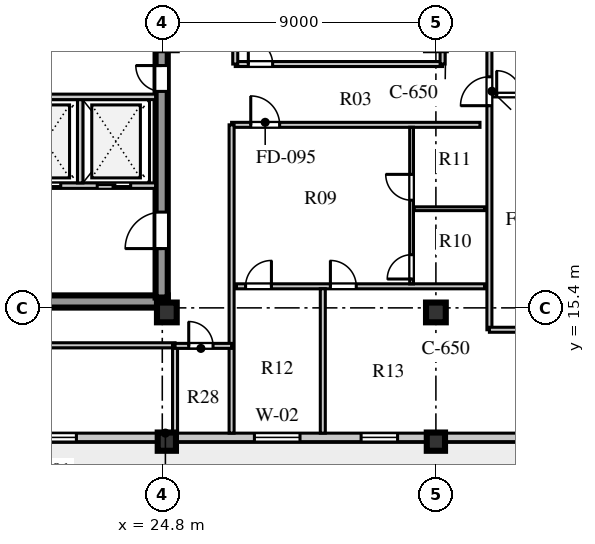
"""IFC4 building model, lengths in metres.
Left out: names, types, materials, properties, quantities, classifications, styles, units other than length and angle.
Written with IfcOpenShell. Run it as: python <this file> out.ifc"""

import sys

from ifc_helpers import new_model, si_unit, direction, frame, frame_2d, origin, origin_2d, place, context, subcontext, project, spatial, rectangle, extrude, element, fill, save


model = new_model("IFC4")
c1 = context("Model", 3, precision=1e-05, world=origin(), true_north=direction((0.0, 1.0)))
c2 = subcontext(c1, "Body", "Model", "MODEL_VIEW")
j1 = project(units=[si_unit("LENGTHUNIT", "METRE"), si_unit("PLANEANGLEUNIT", "RADIAN")], contexts=[c1])
p1 = place(None, origin())
s1 = spatial("IfcSite", under=j1, at=p1, CompositionType="ELEMENT")
p2 = place(p1, origin())
s2 = spatial("IfcBuilding", under=s1, at=p2, CompositionType="ELEMENT")
p3 = place(p2, frame((0.0, 0.0, 327.7)))
s3 = spatial("IfcBuildingStorey", under=s2, at=p3, CompositionType="ELEMENT", Elevation=327.7)
p4 = place(p3, frame((15.5, 15.61, 0.0), z_axis=(0.0, 0.0, 1.0), x_axis=(1.0, 0.0, 0.0)))
e1 = element("IfcWall", 1, at=p4, inside=s3, PredefinedType="SHEAR", context=c2, shape_type="SweptSolid", body=[
    extrude(rectangle(XDim=9.48, YDim=0.4, at=frame_2d((4.74, 0.0))), origin(), (0.0, 0.0, 1.0), 3.56),
])
p5 = place(p3, frame((24.78, 15.74, 0.0), z_axis=(0.0, 0.0, 1.0), x_axis=(0.0, 1.0, 0.0)))
e2 = element("IfcWall", 2, at=p5, inside=s3, PredefinedType="SHEAR", context=c2, shape_type="SweptSolid", body=[
    extrude(rectangle(XDim=25.76, YDim=0.4, at=frame_2d((12.88, 0.0))), origin(), (0.0, 0.0, 1.0), 3.56),
])
p6 = place(p5, frame((1.61, 0.0, 0.0)))
e3 = element("IfcOpeningElement", 3, at=p6, cuts=e2, PredefinedType="OPENING", context=c2, shape_type="SweptSolid", body=[
    extrude(rectangle(XDim=1.2, YDim=2.1, at=frame_2d((0.6, 1.05))), frame((0.0, 0.21, 0.0), z_axis=(0.0, -1.0, 0.0), x_axis=(1.0, 0.0, 0.0)), (0.0, 0.0, 1.0), 0.42),
])
p7 = place(p5, frame((6.78, 0.0, 0.0)))
e4 = element("IfcOpeningElement", 4, at=p7, cuts=e2, PredefinedType="OPENING", context=c2, shape_type="SweptSolid", body=[
    extrude(rectangle(XDim=0.85, YDim=2.06, at=frame_2d((0.425, 1.03))), frame((0.0, 0.21, 0.0), z_axis=(0.0, -1.0, 0.0), x_axis=(1.0, 0.0, 0.0)), (0.0, 0.0, 1.0), 0.42),
])
p8 = place(p5, frame((12.11, 0.0, 0.0)))
e5 = element("IfcOpeningElement", 5, at=p8, cuts=e2, PredefinedType="OPENING", context=c2, shape_type="SweptSolid", body=[
    extrude(rectangle(XDim=1.5, YDim=2.12, at=frame_2d((0.75, 1.06))), frame((0.0, 0.21, 0.0), z_axis=(0.0, -1.0, 0.0), x_axis=(1.0, 0.0, 0.0)), (0.0, 0.0, 1.0), 0.42),
])
p9 = place(p5, frame((20.11, 0.0, 0.0)))
e6 = element("IfcOpeningElement", 6, at=p9, cuts=e2, PredefinedType="OPENING", context=c2, shape_type="SweptSolid", body=[
    extrude(rectangle(XDim=1.2, YDim=2.12, at=frame_2d((0.6, 1.06))), frame((0.0, 0.21, 0.0), z_axis=(0.0, -1.0, 0.0), x_axis=(1.0, 0.0, 0.0)), (0.0, 0.0, 1.0), 0.42),
])
p10 = place(p5, frame((24.01, 0.0, 0.0)))
e7 = element("IfcOpeningElement", 7, at=p10, cuts=e2, PredefinedType="OPENING", context=c2, shape_type="SweptSolid", body=[
    extrude(rectangle(XDim=0.95, YDim=2.1, at=frame_2d((0.475, 1.05))), frame((0.0, 0.21, 0.0), z_axis=(0.0, -1.0, 0.0), x_axis=(1.0, 0.0, 0.0)), (0.0, 0.0, 1.0), 0.42),
])
for number, where, z_axis, x_axis in (
    (8, (24.95, 15.25, 0.0), (0.0, 0.0, 1.0), (1.0, 0.0, 0.0)),
    (9, (33.8, 15.25, 0.0), (0.0, 0.0, 1.0), (1.0, 0.0, 0.0)),
):
    element("IfcColumn", number, at=place(p3, frame(where, z_axis=z_axis, x_axis=x_axis)), inside=s3, PredefinedType="COLUMN", context=c2, shape_type="SweptSolid", body=[
        extrude(rectangle(XDim=0.65, YDim=0.65, at=origin_2d()), origin(), (0.0, 0.0, 1.0), 3.56),
    ])
for number, where, z_axis, x_axis in (
    (10, (24.95, 11.0, 0.0), (0.0, 0.0, 1.0), (1.0, 0.0, 0.0)),
    (11, (33.8, 11.0, 0.0), (0.0, 0.0, 1.0), (1.0, 0.0, 0.0)),
):
    element("IfcColumn", number, at=place(p3, frame(where, z_axis=z_axis, x_axis=x_axis)), inside=s3, PredefinedType="COLUMN", context=c2, shape_type="SweptSolid", body=[
        extrude(rectangle(XDim=0.6, YDim=0.6, at=origin_2d()), origin(), (0.0, 0.0, 1.0), 3.56),
    ])
p11 = place(p3, frame((13.6, 11.14, 0.0), z_axis=(0.0, 0.0, 1.0), x_axis=(1.0, 0.0, 0.0)))
e12 = element("IfcWall", 12, at=p11, inside=s3, PredefinedType="STANDARD", context=c2, shape_type="SweptSolid", body=[
    extrude(rectangle(XDim=28.0, YDim=0.28, at=frame_2d((14.0, 0.0))), origin(), (0.0, 0.0, 1.0), 2.92),
])
p12 = place(p11, frame((2.58, 0.0, 0.0)))
e13 = element("IfcOpeningElement", 13, at=p12, cuts=e12, PredefinedType="OPENING", context=c2, shape_type="SweptSolid", body=[
    extrude(rectangle(XDim=1.2, YDim=2.05, at=frame_2d((0.6, 1.025))), frame((0.0, 0.15, 0.0), z_axis=(0.0, -1.0, 0.0), x_axis=(1.0, 0.0, 0.0)), (0.0, 0.0, 1.0), 0.3),
])
p13 = place(p11, frame((6.575, 0.0, 0.8)))
e14 = element("IfcOpeningElement", 14, at=p13, cuts=e12, PredefinedType="OPENING", context=c2, shape_type="SweptSolid", body=[
    extrude(rectangle(XDim=1.8, YDim=2.0, at=frame_2d((0.9, 1.0))), frame((0.0, 0.15, 0.0), z_axis=(0.0, -1.0, 0.0), x_axis=(1.0, 0.0, 0.0)), (0.0, 0.0, 1.0), 0.3),
])
p14 = place(p11, frame((14.23, 0.0, 0.8)))
e15 = element("IfcOpeningElement", 15, at=p14, cuts=e12, PredefinedType="OPENING", context=c2, shape_type="SweptSolid", body=[
    extrude(rectangle(XDim=1.5, YDim=2.0, at=frame_2d((0.75, 1.0))), frame((0.0, 0.15, 0.0), z_axis=(0.0, -1.0, 0.0), x_axis=(1.0, 0.0, 0.0)), (0.0, 0.0, 1.0), 0.3),
])
p15 = place(p11, frame((17.74, 0.0, 0.8)))
e16 = element("IfcOpeningElement", 16, at=p15, cuts=e12, PredefinedType="OPENING", context=c2, shape_type="SweptSolid", body=[
    extrude(rectangle(XDim=1.2, YDim=1.75, at=frame_2d((0.6, 0.875))), frame((0.0, 0.15, 0.0), z_axis=(0.0, -1.0, 0.0), x_axis=(1.0, 0.0, 0.0)), (0.0, 0.0, 1.0), 0.3),
])
p16 = place(p11, frame((22.965, 0.0, 0.8)))
e17 = element("IfcOpeningElement", 17, at=p16, cuts=e12, PredefinedType="OPENING", context=c2, shape_type="SweptSolid", body=[
    extrude(rectangle(XDim=2.4, YDim=2.05, at=frame_2d((1.2, 1.025))), frame((0.0, 0.15, 0.0), z_axis=(0.0, -1.0, 0.0), x_axis=(1.0, 0.0, 0.0)), (0.0, 0.0, 1.0), 0.3),
])
p17 = place(p3, frame((19.64, 19.42, 0.0), z_axis=(0.0, 0.0, 1.0), x_axis=(1.0, 0.0, 0.0)))
e18 = element("IfcWall", 18, at=p17, inside=s3, PredefinedType="SOLIDWALL", context=c2, shape_type="SweptSolid", body=[
    extrude(rectangle(XDim=4.94, YDim=0.18, at=frame_2d((2.47, 0.0))), origin(), (0.0, 0.0, 1.0), 3.56),
])
p18 = place(p17, frame((0.72, 0.0, 0.0)))
e19 = element("IfcOpeningElement", 19, at=p18, cuts=e18, PredefinedType="OPENING", context=c2, shape_type="SweptSolid", body=[
    extrude(rectangle(XDim=1.1, YDim=2.1, at=frame_2d((0.55, 1.05))), frame((0.0, 0.1, 0.0), z_axis=(0.0, -1.0, 0.0), x_axis=(1.0, 0.0, 0.0)), (0.0, 0.0, 1.0), 0.2),
])
p19 = place(p17, frame((3.02, 0.0, 0.0)))
e20 = element("IfcOpeningElement", 20, at=p19, cuts=e18, PredefinedType="OPENING", context=c2, shape_type="SweptSolid", body=[
    extrude(rectangle(XDim=1.1, YDim=2.1, at=frame_2d((0.55, 1.05))), frame((0.0, 0.1, 0.0), z_axis=(0.0, -1.0, 0.0), x_axis=(1.0, 0.0, 0.0)), (0.0, 0.0, 1.0), 0.2),
])
p20 = place(p3, frame((22.1, 19.51, 0.0), z_axis=(0.0, 0.0, 1.0), x_axis=(0.0, 1.0, 0.0)))
e21 = element("IfcWall", 21, at=p20, inside=s3, PredefinedType="SOLIDWALL", context=c2, shape_type="SweptSolid", body=[
    extrude(rectangle(XDim=2.74, YDim=0.18, at=frame_2d((1.37, 0.0))), origin(), (0.0, 0.0, 1.0), 3.56),
])
p21 = place(p3, frame((19.64, 22.34, 0.0), z_axis=(0.0, 0.0, 1.0), x_axis=(1.0, 0.0, 0.0)))
e22 = element("IfcWall", 22, at=p21, inside=s3, PredefinedType="SOLIDWALL", context=c2, shape_type="SweptSolid", body=[
    extrude(rectangle(XDim=4.94, YDim=0.18, at=frame_2d((2.47, 0.0))), origin(), (0.0, 0.0, 1.0), 3.56),
])
p22 = place(p3, frame((27.08, 21.42, 0.0), z_axis=(0.0, 0.0, 1.0), x_axis=(1.0, 0.0, 0.0)))
e23 = element("IfcWall", 23, at=p22, inside=s3, PredefinedType="PARTITIONING", context=c2, shape_type="SweptSolid", body=[
    extrude(rectangle(XDim=8.17, YDim=0.165, at=frame_2d((4.085, 0.0))), origin(), (0.0, 0.0, 1.0), 3.26),
])
p23 = place(p22, frame((0.63, 0.0, 0.0)))
e24 = element("IfcOpeningElement", 24, at=p23, cuts=e23, PredefinedType="OPENING", context=c2, shape_type="SweptSolid", body=[
    extrude(rectangle(XDim=0.95, YDim=2.1, at=frame_2d((0.475, 1.05))), frame((0.0, 0.093, 0.0), z_axis=(0.0, -1.0, 0.0), x_axis=(1.0, 0.0, 0.0)), (0.0, 0.0, 1.0), 0.185),
])
p24 = place(p3, frame((27.08, 11.28, 0.0), z_axis=(0.0, 0.0, 1.0), x_axis=(0.0, 1.0, 0.0)))
e25 = element("IfcWall", 25, at=p24, inside=s3, PredefinedType="PARTITIONING", context=c2, shape_type="SweptSolid", body=[
    extrude(rectangle(XDim=10.14, YDim=0.165, at=frame_2d((5.07, 0.0))), origin(), (0.0, 0.0, 1.0), 3.56),
])
p25 = place(p3, frame((13.95, 14.17, 0.0), z_axis=(0.0, 0.0, 1.0), x_axis=(1.0, 0.0, 0.0)))
e26 = element("IfcWall", 26, at=p25, inside=s3, PredefinedType="PARTITIONING", context=c2, shape_type="SweptSolid", body=[
    extrude(rectangle(XDim=11.27, YDim=0.165, at=frame_2d((5.635, 0.0))), origin(), (0.0, 0.0, 1.0), 3.56),
])
p26 = place(p25, frame((3.2, 0.0, 0.0)))
e27 = element("IfcOpeningElement", 27, at=p26, cuts=e26, PredefinedType="OPENING", context=c2, shape_type="SweptSolid", body=[
    extrude(rectangle(XDim=0.95, YDim=2.08, at=frame_2d((0.475, 1.04))), frame((0.0, 0.093, 0.0), z_axis=(0.0, -1.0, 0.0), x_axis=(1.0, 0.0, 0.0)), (0.0, 0.0, 1.0), 0.185),
])
p27 = place(p3, frame((25.22, 11.28, 0.0), z_axis=(0.0, 0.0, 1.0), x_axis=(0.0, 1.0, 0.0)))
e28 = element("IfcWall", 28, at=p27, inside=s3, PredefinedType="PARTITIONING", context=c2, shape_type="SweptSolid", body=[
    extrude(rectangle(XDim=2.89, YDim=0.165, at=frame_2d((1.445, 0.0))), origin(), (0.0, 0.0, 1.0), 3.11),
])
p28 = place(p3, frame((27.24, 16.109, 0.0), z_axis=(0.0, 0.0, 1.0), x_axis=(1.0, 0.0, 0.0)))
e29 = element("IfcWall", 29, at=p28, inside=s3, PredefinedType="PARTITIONING", context=c2, shape_type="SweptSolid", body=[
    extrude(rectangle(XDim=8.16, YDim=0.165, at=frame_2d((4.08, 0.0))), origin(), (0.0, 0.0, 1.0), 3.56),
])
p29 = place(p28, frame((0.3, 0.0, 0.0)))
e30 = element("IfcOpeningElement", 30, at=p29, cuts=e29, PredefinedType="OPENING", context=c2, shape_type="SweptSolid", body=[
    extrude(rectangle(XDim=0.85, YDim=2.08, at=frame_2d((0.425, 1.04))), frame((0.0, 0.093, 0.0), z_axis=(0.0, -1.0, 0.0), x_axis=(1.0, 0.0, 0.0)), (0.0, 0.0, 1.0), 0.185),
])
p30 = place(p28, frame((3.09, 0.0, 0.0)))
e31 = element("IfcOpeningElement", 31, at=p30, cuts=e29, PredefinedType="OPENING", context=c2, shape_type="SweptSolid", body=[
    extrude(rectangle(XDim=0.85, YDim=2.08, at=frame_2d((0.425, 1.04))), frame((0.0, 0.093, 0.0), z_axis=(0.0, -1.0, 0.0), x_axis=(1.0, 0.0, 0.0)), (0.0, 0.0, 1.0), 0.185),
])
p31 = place(p3, frame((33.0, 16.189, 0.0), z_axis=(0.0, 0.0, 1.0), x_axis=(0.0, 1.0, 0.0)))
e32 = element("IfcWall", 32, at=p31, inside=s3, PredefinedType="PLUMBINGWALL", context=c2, shape_type="SweptSolid", body=[
    extrude(rectangle(XDim=5.151, YDim=0.125, at=frame_2d((2.576, 0.0))), origin(), (0.0, 0.0, 1.0), 3.56),
])
p32 = place(p31, frame((0.16, 0.0, 0.0)))
e33 = element("IfcOpeningElement", 33, at=p32, cuts=e32, PredefinedType="OPENING", context=c2, shape_type="SweptSolid", body=[
    extrude(rectangle(XDim=0.8, YDim=2.05, at=frame_2d((0.4, 1.025))), frame((0.0, 0.073, 0.0), z_axis=(0.0, -1.0, 0.0), x_axis=(1.0, 0.0, 0.0)), (0.0, 0.0, 1.0), 0.145),
])
p33 = place(p31, frame((2.752, 0.0, 0.0)))
e34 = element("IfcOpeningElement", 34, at=p33, cuts=e32, PredefinedType="OPENING", context=c2, shape_type="SweptSolid", body=[
    extrude(rectangle(XDim=0.85, YDim=2.08, at=frame_2d((0.425, 1.04))), frame((0.0, 0.073, 0.0), z_axis=(0.0, -1.0, 0.0), x_axis=(1.0, 0.0, 0.0)), (0.0, 0.0, 1.0), 0.145),
])
p34 = place(p3, frame((33.08, 18.661, 0.0), z_axis=(0.0, 0.0, 1.0), x_axis=(1.0, 0.0, 0.0)))
e35 = element("IfcWall", 35, at=p34, inside=s3, PredefinedType="PLUMBINGWALL", context=c2, shape_type="SweptSolid", body=[
    extrude(rectangle(XDim=2.32, YDim=0.125, at=frame_2d((1.16, 0.0))), origin(), (0.0, 0.0, 1.0), 3.56),
])
p35 = place(p3, frame((30.08, 11.28, 0.0), z_axis=(0.0, 0.0, 1.0), x_axis=(0.0, 1.0, 0.0)))
e36 = element("IfcWall", 36, at=p35, inside=s3, PredefinedType="PARTITIONING", context=c2, shape_type="SweptSolid", body=[
    extrude(rectangle(XDim=4.749, YDim=0.165, at=frame_2d((2.375, 0.0))), origin(), (0.0, 0.0, 1.0), 3.56),
])
p36 = place(p3, frame((35.56, 14.68, 0.0), z_axis=(0.0, 0.0, 1.0), x_axis=(0.0, 1.0, 0.0)))
e37 = element("IfcWall", 37, at=p36, inside=s3, PredefinedType="PARTITIONING", context=c2, shape_type="SweptSolid", body=[
    extrude(rectangle(XDim=12.57, YDim=0.165, at=frame_2d((6.285, 0.0))), origin(), (0.0, 0.0, 1.0), 3.56),
])
p37 = place(p36, frame((7.37, 0.0, 0.0)))
e38 = element("IfcOpeningElement", 38, at=p37, cuts=e37, PredefinedType="OPENING", context=c2, shape_type="SweptSolid", body=[
    extrude(rectangle(XDim=0.95, YDim=2.1, at=frame_2d((0.475, 1.05))), frame((0.0, 0.093, 0.0), z_axis=(0.0, -1.0, 0.0), x_axis=(1.0, 0.0, 0.0)), (0.0, 0.0, 1.0), 0.185),
])
p38 = place(p3, frame((35.56, 14.68, 0.0), z_axis=(0.0, 0.0, 1.0), x_axis=(1.0, 0.0, 0.0)))
e39 = element("IfcWall", 39, at=p38, inside=s3, PredefinedType="PARTITIONING", context=c2, shape_type="SweptSolid", body=[
    extrude(rectangle(XDim=9.16, YDim=0.165, at=frame_2d((4.58, 0.0))), origin(), (0.0, 0.0, 1.0), 3.56),
])
p39 = place(p3, frame((35.64, 22.4, 0.0), z_axis=(0.0, 0.0, 1.0), x_axis=(1.0, 0.0, 0.0)))
e40 = element("IfcWall", 40, at=p39, inside=s3, PredefinedType="PLUMBINGWALL", context=c2, shape_type="SweptSolid", body=[
    extrude(rectangle(XDim=4.823, YDim=0.125, at=frame_2d((2.412, 0.0))), origin(), (0.0, 0.0, 1.0), 3.56),
])
p40 = place(p39, frame((0.16, 0.0, 0.0)))
e41 = element("IfcOpeningElement", 41, at=p40, cuts=e40, PredefinedType="OPENING", context=c2, shape_type="SweptSolid", body=[
    extrude(rectangle(XDim=0.8, YDim=2.05, at=frame_2d((0.4, 1.025))), frame((0.0, 0.073, 0.0), z_axis=(0.0, -1.0, 0.0), x_axis=(1.0, 0.0, 0.0)), (0.0, 0.0, 1.0), 0.145),
])
p41 = place(p39, frame((2.575, 0.0, 0.0)))
e42 = element("IfcOpeningElement", 42, at=p41, cuts=e40, PredefinedType="OPENING", context=c2, shape_type="SweptSolid", body=[
    extrude(rectangle(XDim=0.8, YDim=2.05, at=frame_2d((0.4, 1.025))), frame((0.0, 0.073, 0.0), z_axis=(0.0, -1.0, 0.0), x_axis=(1.0, 0.0, 0.0)), (0.0, 0.0, 1.0), 0.145),
])
p42 = place(p3, frame((27.2, 23.42, 0.0), z_axis=(0.0, 0.0, 1.0), x_axis=(1.0, 0.0, 0.0)))
e43 = element("IfcWall", 43, at=p42, inside=s3, PredefinedType="PARTITIONING", context=c2, shape_type="SweptSolid", body=[
    extrude(rectangle(XDim=6.82, YDim=0.165, at=frame_2d((3.41, 0.0))), origin(), (0.0, 0.0, 1.0), 3.56),
])
p43 = place(p42, frame((0.43, 0.0, 0.0)))
e44 = element("IfcOpeningElement", 44, at=p43, cuts=e43, PredefinedType="OPENING", context=c2, shape_type="SweptSolid", body=[
    extrude(rectangle(XDim=0.8, YDim=2.05, at=frame_2d((0.4, 1.025))), frame((0.0, 0.093, 0.0), z_axis=(0.0, -1.0, 0.0), x_axis=(1.0, 0.0, 0.0)), (0.0, 0.0, 1.0), 0.185),
])
p44 = place(p3, frame((27.2, 23.42, 0.0), z_axis=(0.0, 0.0, 1.0), x_axis=(0.0, 1.0, 0.0)))
e45 = element("IfcWall", 45, at=p44, inside=s3, PredefinedType="PARTITIONING", context=c2, shape_type="SweptSolid", body=[
    extrude(rectangle(XDim=1.46, YDim=0.165, at=frame_2d((0.73, 0.0))), origin(), (0.0, 0.0, 1.0), 3.56),
])
p45 = place(p3, frame((34.02, 23.42, 0.0), z_axis=(0.0, 0.0, 1.0), x_axis=(0.0, 1.0, 0.0)))
e46 = element("IfcWall", 46, at=p45, inside=s3, PredefinedType="PARTITIONING", context=c2, shape_type="SweptSolid", body=[
    extrude(rectangle(XDim=1.46, YDim=0.165, at=frame_2d((0.73, 0.0))), origin(), (0.0, 0.0, 1.0), 2.96),
])
p46 = place(p3, frame((25.22, 14.15, 0.0), z_axis=(0.0, 0.0, 1.0), x_axis=(1.0, 0.0, 0.0)))
e47 = element("IfcWall", 47, at=p46, inside=s3, PredefinedType="PARTITIONING", context=c2, shape_type="SweptSolid", body=[
    extrude(rectangle(XDim=1.86, YDim=0.165, at=frame_2d((0.93, 0.0))), origin(), (0.0, 0.0, 1.0), 3.56),
])
p47 = place(p46, frame((0.45, 0.0, 0.0)))
e48 = element("IfcOpeningElement", 48, at=p47, cuts=e47, PredefinedType="OPENING", context=c2, shape_type="SweptSolid", body=[
    extrude(rectangle(XDim=0.8, YDim=2.05, at=frame_2d((0.4, 1.025))), frame((0.0, 0.093, 0.0), z_axis=(0.0, -1.0, 0.0), x_axis=(1.0, 0.0, 0.0)), (0.0, 0.0, 1.0), 0.185),
])
p48 = place(p13, origin())
e49 = element("IfcWindow", 49, at=p48, inside=s3, PartitioningType="SINGLE_PANEL", PredefinedType="WINDOW", context=c2, shape_type="SweptSolid", body=[
    extrude(rectangle(XDim=1.8, YDim=2.0, at=frame_2d((0.9, 1.0))), frame((0.0, 0.03, 0.0), z_axis=(0.0, -1.0, 0.0), x_axis=(1.0, 0.0, 0.0)), (0.0, 0.0, 1.0), 0.06),
])
fill(e14, e49)
p49 = place(p14, origin())
e50 = element("IfcWindow", 50, at=p49, inside=s3, PartitioningType="SINGLE_PANEL", PredefinedType="WINDOW", context=c2, shape_type="SweptSolid", body=[
    extrude(rectangle(XDim=1.5, YDim=2.0, at=frame_2d((0.75, 1.0))), frame((0.0, 0.03, 0.0), z_axis=(0.0, -1.0, 0.0), x_axis=(1.0, 0.0, 0.0)), (0.0, 0.0, 1.0), 0.06),
])
fill(e15, e50)
p50 = place(p15, origin())
e51 = element("IfcWindow", 51, at=p50, inside=s3, PartitioningType="SINGLE_PANEL", PredefinedType="WINDOW", context=c2, shape_type="SweptSolid", body=[
    extrude(rectangle(XDim=1.2, YDim=1.75, at=frame_2d((0.6, 0.875))), frame((0.0, 0.03, 0.0), z_axis=(0.0, -1.0, 0.0), x_axis=(1.0, 0.0, 0.0)), (0.0, 0.0, 1.0), 0.06),
])
fill(e16, e51)
p51 = place(p18, origin())
e52 = element("IfcDoor", 52, at=p51, inside=s3, OperationType="DOUBLE_DOOR_SLIDING", PredefinedType="DOOR", context=c2, shape_type="SweptSolid", body=[
    extrude(rectangle(XDim=1.1, YDim=2.1, at=frame_2d((0.55, 1.05))), frame((0.0, 0.025, 0.0), z_axis=(0.0, -1.0, 0.0), x_axis=(1.0, 0.0, 0.0)), (0.0, 0.0, 1.0), 0.05),
])
fill(e19, e52)
p52 = place(p19, origin())
e53 = element("IfcDoor", 53, at=p52, inside=s3, OperationType="DOUBLE_DOOR_SLIDING", PredefinedType="DOOR", context=c2, shape_type="SweptSolid", body=[
    extrude(rectangle(XDim=1.1, YDim=2.1, at=frame_2d((0.55, 1.05))), frame((0.0, 0.025, 0.0), z_axis=(0.0, -1.0, 0.0), x_axis=(1.0, 0.0, 0.0)), (0.0, 0.0, 1.0), 0.05),
])
fill(e20, e53)
p53 = place(p6, frame((1.2, 0.0, 0.0), z_axis=(0.0, 0.0, 1.0), x_axis=(-1.0, 0.0, 0.0)))
e54 = element("IfcDoor", 54, at=p53, inside=s3, OperationType="SINGLE_SWING_RIGHT", PredefinedType="DOOR", context=c2, shape_type="SweptSolid", body=[
    extrude(rectangle(XDim=1.2, YDim=2.1, at=frame_2d((0.6, 1.05))), frame((0.0, 0.025, 0.0), z_axis=(0.0, -1.0, 0.0), x_axis=(1.0, 0.0, 0.0)), (0.0, 0.0, 1.0), 0.05),
])
fill(e3, e54)
p54 = place(p7, frame((0.85, 0.0, 0.0), z_axis=(0.0, 0.0, 1.0), x_axis=(-1.0, 0.0, 0.0)))
e55 = element("IfcDoor", 55, at=p54, inside=s3, OperationType="SINGLE_SWING_LEFT", PredefinedType="DOOR", context=c2, shape_type="SweptSolid", body=[
    extrude(rectangle(XDim=0.85, YDim=2.06, at=frame_2d((0.425, 1.03))), frame((0.0, 0.025, 0.0), z_axis=(0.0, -1.0, 0.0), x_axis=(1.0, 0.0, 0.0)), (0.0, 0.0, 1.0), 0.05),
])
fill(e4, e55)
p55 = place(p32, origin())
e56 = element("IfcDoor", 56, at=p55, inside=s3, OperationType="SINGLE_SWING_LEFT", PredefinedType="DOOR", context=c2, shape_type="SweptSolid", body=[
    extrude(rectangle(XDim=0.8, YDim=2.05, at=frame_2d((0.4, 1.025))), frame((0.0, 0.025, 0.0), z_axis=(0.0, -1.0, 0.0), x_axis=(1.0, 0.0, 0.0)), (0.0, 0.0, 1.0), 0.05),
])
fill(e33, e56)
p56 = place(p33, origin())
e57 = element("IfcDoor", 57, at=p56, inside=s3, OperationType="SINGLE_SWING_RIGHT", PredefinedType="DOOR", context=c2, shape_type="SweptSolid", body=[
    extrude(rectangle(XDim=0.85, YDim=2.08, at=frame_2d((0.425, 1.04))), frame((0.0, 0.025, 0.0), z_axis=(0.0, -1.0, 0.0), x_axis=(1.0, 0.0, 0.0)), (0.0, 0.0, 1.0), 0.05),
])
fill(e34, e57)
p57 = place(p29, frame((0.85, 0.0, 0.0), z_axis=(0.0, 0.0, 1.0), x_axis=(-1.0, 0.0, 0.0)))
e58 = element("IfcDoor", 58, at=p57, inside=s3, OperationType="SINGLE_SWING_LEFT", PredefinedType="DOOR", context=c2, shape_type="SweptSolid", body=[
    extrude(rectangle(XDim=0.85, YDim=2.08, at=frame_2d((0.425, 1.04))), frame((0.0, 0.025, 0.0), z_axis=(0.0, -1.0, 0.0), x_axis=(1.0, 0.0, 0.0)), (0.0, 0.0, 1.0), 0.05),
])
fill(e30, e58)
p58 = place(p30, frame((0.85, 0.0, 0.0), z_axis=(0.0, 0.0, 1.0), x_axis=(-1.0, 0.0, 0.0)))
e59 = element("IfcDoor", 59, at=p58, inside=s3, OperationType="SINGLE_SWING_RIGHT", PredefinedType="DOOR", context=c2, shape_type="SweptSolid", body=[
    extrude(rectangle(XDim=0.85, YDim=2.08, at=frame_2d((0.425, 1.04))), frame((0.0, 0.025, 0.0), z_axis=(0.0, -1.0, 0.0), x_axis=(1.0, 0.0, 0.0)), (0.0, 0.0, 1.0), 0.05),
])
fill(e31, e59)
p59 = place(p23, frame((0.95, 0.0, 0.0), z_axis=(0.0, 0.0, 1.0), x_axis=(-1.0, 0.0, 0.0)))
e60 = element("IfcDoor", 60, at=p59, inside=s3, OperationType="SINGLE_SWING_RIGHT", PredefinedType="DOOR", context=c2, shape_type="SweptSolid", body=[
    extrude(rectangle(XDim=0.95, YDim=2.1, at=frame_2d((0.475, 1.05))), frame((0.0, 0.025, 0.0), z_axis=(0.0, -1.0, 0.0), x_axis=(1.0, 0.0, 0.0)), (0.0, 0.0, 1.0), 0.05),
])
fill(e24, e60)
p60 = place(p40, origin())
e61 = element("IfcDoor", 61, at=p60, inside=s3, OperationType="SINGLE_SWING_LEFT", PredefinedType="DOOR", context=c2, shape_type="SweptSolid", body=[
    extrude(rectangle(XDim=0.8, YDim=2.05, at=frame_2d((0.4, 1.025))), frame((0.0, 0.025, 0.0), z_axis=(0.0, -1.0, 0.0), x_axis=(1.0, 0.0, 0.0)), (0.0, 0.0, 1.0), 0.05),
])
fill(e41, e61)
p61 = place(p37, origin())
e62 = element("IfcDoor", 62, at=p61, inside=s3, OperationType="SINGLE_SWING_LEFT", PredefinedType="DOOR", context=c2, shape_type="SweptSolid", body=[
    extrude(rectangle(XDim=0.95, YDim=2.1, at=frame_2d((0.475, 1.05))), frame((0.0, 0.025, 0.0), z_axis=(0.0, -1.0, 0.0), x_axis=(1.0, 0.0, 0.0)), (0.0, 0.0, 1.0), 0.05),
])
fill(e38, e62)
p62 = place(p43, origin())
e63 = element("IfcDoor", 63, at=p62, inside=s3, OperationType="SINGLE_SWING_LEFT", PredefinedType="DOOR", context=c2, shape_type="SweptSolid", body=[
    extrude(rectangle(XDim=0.8, YDim=2.05, at=frame_2d((0.4, 1.025))), frame((0.0, 0.025, 0.0), z_axis=(0.0, -1.0, 0.0), x_axis=(1.0, 0.0, 0.0)), (0.0, 0.0, 1.0), 0.05),
])
fill(e44, e63)
p63 = place(p47, origin())
e64 = element("IfcDoor", 64, at=p63, inside=s3, OperationType="SINGLE_SWING_LEFT", PredefinedType="DOOR", context=c2, shape_type="SweptSolid", body=[
    extrude(rectangle(XDim=0.8, YDim=2.05, at=frame_2d((0.4, 1.025))), frame((0.0, 0.025, 0.0), z_axis=(0.0, -1.0, 0.0), x_axis=(1.0, 0.0, 0.0)), (0.0, 0.0, 1.0), 0.05),
])
fill(e48, e64)
save(model, sys.argv[1])
